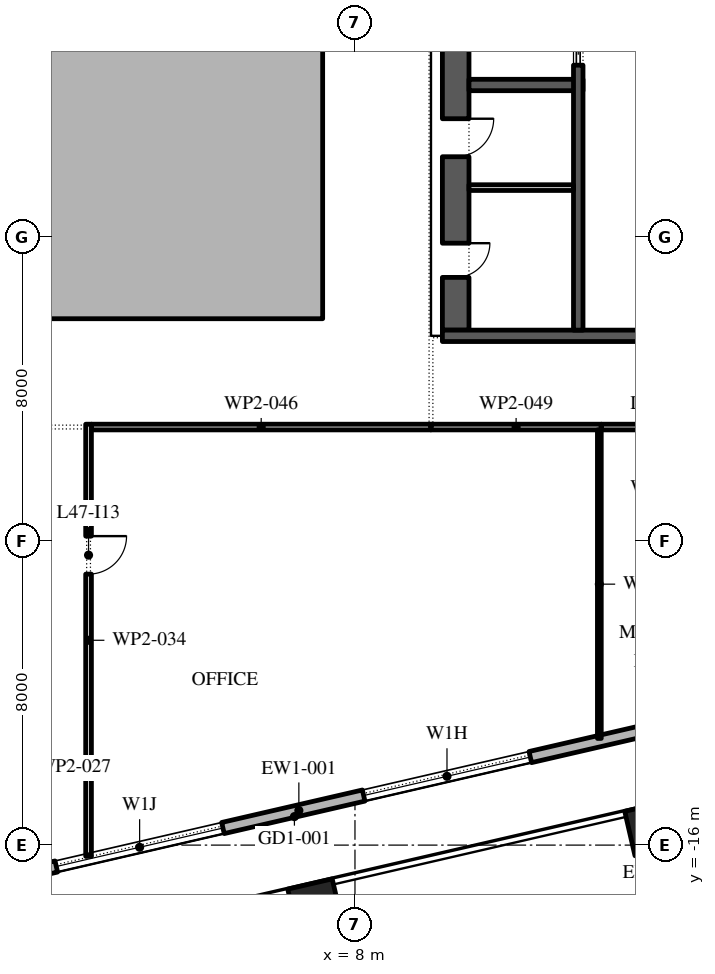
"""IFC4 building model, lengths in metres.
Left out: names, types, materials, properties, quantities, classifications, styles, units other than length and angle.
Written with IfcOpenShell. Run it as: python <this file> out.ifc"""

import sys

from ifc_helpers import new_model, si_unit, direction, frame, frame_2d, origin, origin_2d, place, context, subcontext, project, spatial, polyline, rectangle, outline, extrude, element, fill, save


model = new_model("IFC4")
c1 = context("Model", 3, precision=1e-05, world=origin(), true_north=direction((0.0, 1.0)))
c2 = subcontext(c1, "Body", "Model", "MODEL_VIEW")
j1 = project(units=[si_unit("LENGTHUNIT", "METRE"), si_unit("PLANEANGLEUNIT", "RADIAN")], contexts=[c1])
p1 = place(None, origin())
s1 = spatial("IfcSite", under=j1, at=p1, CompositionType="ELEMENT")
p2 = place(p1, origin())
s2 = spatial("IfcBuilding", under=s1, at=p2, CompositionType="ELEMENT")
p3 = place(p2, frame((0.0, 0.0, 213.6)))
s3 = spatial("IfcBuildingStorey", under=s2, at=p3, CompositionType="ELEMENT", Elevation=213.6)
for number, where, z_axis, x_axis in (
    (1, (6.951, -17.608, 0.0), (0.0, 0.0, 1.0), (0.974, 0.225, 0.0)),
    (2, (15.818, -15.561, 0.0), (0.0, 0.0, 1.0), (0.974, 0.225, 0.0)),
):
    element("IfcColumn", number, at=place(p3, frame(where, z_axis=z_axis, x_axis=x_axis)), inside=s3, PredefinedType="COLUMN", context=c2, shape_type="SweptSolid", body=[
        extrude(rectangle(XDim=1.2, YDim=1.2, at=origin_2d()), origin(), (0.0, 0.0, 1.0), 4.2),
    ])
p4 = place(p3, origin())
e3 = element("IfcWall", 3, at=p4, inside=s3, PredefinedType="STANDARD", context=c2, shape_type="SweptSolid", body=[
    extrude(outline(polyline([(-7.15, -2.15), (7.15, -2.15), (7.15, 16.15), (-7.15, 16.15), (-7.15, -2.15)]), holes=[polyline([(-7.0, -2.0), (-7.0, 16.0), (7.0, 16.0), (7.0, -2.0), (-7.0, -2.0)])]), origin(), (0.0, 0.0, 1.0), 4.0),
])
p5 = place(p3, frame((-17.592, -20.657, 0.0), z_axis=(0.0, 0.0, 1.0), x_axis=(0.974370243697, 0.224950279389, 0.0)))
e4 = element("IfcWall", 4, at=p5, inside=s3, PredefinedType="STANDARD", context=c2, shape_type="SweptSolid", body=[
    extrude(rectangle(XDim=49.5, YDim=0.3, at=frame_2d((24.75, 0.0))), origin(), (0.0, 0.0, 1.0), 4.0),
])
p6 = place(p5, frame((2.8, 0.0, 0.0)))
e5 = element("IfcOpeningElement", 5, at=p6, cuts=e4, PredefinedType="OPENING", context=c2, shape_type="SweptSolid", body=[
    extrude(rectangle(XDim=2.4, YDim=3.5, at=frame_2d((1.2, 1.75))), frame((0.0, 0.16, 0.0), z_axis=(0.0, -1.0, 0.0), x_axis=(1.0, 0.0, 0.0)), (0.0, 0.0, 1.0), 0.32),
])
p7 = place(p5, frame((9.9, 0.0, 0.45)))
e6 = element("IfcOpeningElement", 6, at=p7, cuts=e4, PredefinedType="OPENING", context=c2, shape_type="SweptSolid", body=[
    extrude(rectangle(XDim=4.5, YDim=2.575, at=frame_2d((2.25, 1.288))), frame((0.0, 0.16, 0.0), z_axis=(0.0, -1.0, 0.0), x_axis=(1.0, 0.0, 0.0)), (0.0, 0.0, 1.0), 0.32),
])
p8 = place(p5, frame((18.2, 0.0, 0.45)))
e7 = element("IfcOpeningElement", 7, at=p8, cuts=e4, PredefinedType="OPENING", context=c2, shape_type="SweptSolid", body=[
    extrude(rectangle(XDim=4.5, YDim=2.675, at=frame_2d((2.25, 1.337))), frame((0.0, 0.16, 0.0), z_axis=(0.0, -1.0, 0.0), x_axis=(1.0, 0.0, 0.0)), (0.0, 0.0, 1.0), 0.32),
])
p9 = place(p5, frame((26.5, 0.0, 0.45)))
e8 = element("IfcOpeningElement", 8, at=p9, cuts=e4, PredefinedType="OPENING", context=c2, shape_type="SweptSolid", body=[
    extrude(rectangle(XDim=4.5, YDim=2.75, at=frame_2d((2.25, 1.375))), frame((0.0, 0.16, 0.0), z_axis=(0.0, -1.0, 0.0), x_axis=(1.0, 0.0, 0.0)), (0.0, 0.0, 1.0), 0.32),
])
p10 = place(p5, frame((36.8, 0.0, 0.0)))
e9 = element("IfcOpeningElement", 9, at=p10, cuts=e4, PredefinedType="OPENING", context=c2, shape_type="SweptSolid", body=[
    extrude(rectangle(XDim=2.4, YDim=3.275, at=frame_2d((1.2, 1.637))), frame((0.0, 0.16, 0.0), z_axis=(0.0, -1.0, 0.0), x_axis=(1.0, 0.0, 0.0)), (0.0, 0.0, 1.0), 0.32),
])
p11 = place(p5, frame((43.1, 0.0, 0.45)))
e10 = element("IfcOpeningElement", 10, at=p11, cuts=e4, PredefinedType="OPENING", context=c2, shape_type="SweptSolid", body=[
    extrude(rectangle(XDim=4.5, YDim=2.875, at=frame_2d((2.25, 1.438))), frame((0.0, 0.16, 0.0), z_axis=(0.0, -1.0, 0.0), x_axis=(1.0, 0.0, 0.0)), (0.0, 0.0, 1.0), 0.32),
])
p12 = place(p3, frame((10.65, -2.45, 0.0), z_axis=(0.0, 0.0, 1.0), x_axis=(0.0, 1.0, 0.0)))
e11 = element("IfcWall", 11, at=p12, inside=s3, PredefinedType="SHEAR", context=c2, shape_type="SweptSolid", body=[
    extrude(rectangle(XDim=27.9, YDim=0.7, at=frame_2d((13.95, 0.0))), origin(), (0.0, 0.0, 1.0), 4.0),
])
p13 = place(p12, frame((23.65, 0.0, 0.0)))
e12 = element("IfcOpeningElement", 12, at=p13, cuts=e11, PredefinedType="OPENING", context=c2, shape_type="SweptSolid", body=[
    extrude(rectangle(XDim=2.4, YDim=2.1, at=frame_2d((1.2, 1.05))), frame((0.0, 0.36, 0.0), z_axis=(0.0, -1.0, 0.0), x_axis=(1.0, 0.0, 0.0)), (0.0, 0.0, 1.0), 0.72),
])
p14 = place(p12, frame((1.387, 0.0, 0.0)))
e13 = element("IfcOpeningElement", 13, at=p14, cuts=e11, PredefinedType="OPENING", context=c2, shape_type="SweptSolid", body=[
    extrude(rectangle(XDim=0.9, YDim=2.1, at=frame_2d((0.45, 1.05))), frame((0.0, 0.36, 0.0), z_axis=(0.0, -1.0, 0.0), x_axis=(1.0, 0.0, 0.0)), (0.0, 0.0, 1.0), 0.72),
])
p15 = place(p12, frame((4.562, 0.0, 0.0)))
e14 = element("IfcOpeningElement", 14, at=p15, cuts=e11, PredefinedType="OPENING", context=c2, shape_type="SweptSolid", body=[
    extrude(rectangle(XDim=1.0, YDim=2.1, at=frame_2d((0.5, 1.05))), frame((0.0, 0.36, 0.0), z_axis=(0.0, -1.0, 0.0), x_axis=(1.0, 0.0, 0.0)), (0.0, 0.0, 1.0), 0.72),
])
p16 = place(p3, frame((10.3, -2.6, 0.0), z_axis=(0.0, 0.0, 1.0), x_axis=(1.0, 0.0, 0.0)))
e15 = element("IfcWall", 15, at=p16, inside=s3, PredefinedType="SHEAR", context=c2, shape_type="SweptSolid", body=[
    extrude(rectangle(XDim=11.4, YDim=0.3, at=frame_2d((5.7, 0.0))), origin(), (0.0, 0.0, 1.0), 4.0),
])
p17 = place(p3, frame((11.0, 4.0, 0.0), z_axis=(0.0, 0.0, 1.0), x_axis=(1.0, 0.0, 0.0)))
e16 = element("IfcWall", 16, at=p17, inside=s3, PredefinedType="SHEAR", context=c2, shape_type="SweptSolid", body=[
    extrude(rectangle(XDim=3.0, YDim=0.3, at=frame_2d((1.5, 0.0))), origin(), (0.0, 0.0, 1.0), 4.0),
])
p18 = place(p3, frame((13.875, -2.45, 0.0), z_axis=(0.0, 0.0, 1.0), x_axis=(0.0, 1.0, 0.0)))
e17 = element("IfcWall", 17, at=p18, inside=s3, PredefinedType="SHEAR", context=c2, shape_type="SweptSolid", body=[
    extrude(rectangle(XDim=21.3, YDim=0.25, at=frame_2d((10.65, 0.0))), origin(), (0.0, 0.0, 1.0), 4.0),
])
p19 = place(p18, frame((17.786, 0.0, 0.0)))
e18 = element("IfcOpeningElement", 18, at=p19, cuts=e17, PredefinedType="OPENING", context=c2, shape_type="SweptSolid", body=[
    extrude(rectangle(XDim=0.9, YDim=2.1, at=frame_2d((0.45, 1.05))), frame((0.0, 0.135, 0.0), z_axis=(0.0, -1.0, 0.0), x_axis=(1.0, 0.0, 0.0)), (0.0, 0.0, 1.0), 0.27),
])
p20 = place(p18, frame((6.971, 0.0, 0.0)))
e19 = element("IfcOpeningElement", 19, at=p20, cuts=e17, PredefinedType="OPENING", context=c2, shape_type="SweptSolid", body=[
    extrude(rectangle(XDim=1.1, YDim=2.1, at=frame_2d((0.55, 1.05))), frame((0.0, 0.135, 0.0), z_axis=(0.0, -1.0, 0.0), x_axis=(1.0, 0.0, 0.0)), (0.0, 0.0, 1.0), 0.27),
])
p21 = place(p18, frame((9.114, 0.0, 0.0)))
e20 = element("IfcOpeningElement", 20, at=p21, cuts=e17, PredefinedType="OPENING", context=c2, shape_type="SweptSolid", body=[
    extrude(rectangle(XDim=1.1, YDim=2.1, at=frame_2d((0.55, 1.05))), frame((0.0, 0.135, 0.0), z_axis=(0.0, -1.0, 0.0), x_axis=(1.0, 0.0, 0.0)), (0.0, 0.0, 1.0), 0.27),
])
p22 = place(p18, frame((11.257, 0.0, 0.0)))
e21 = element("IfcOpeningElement", 21, at=p22, cuts=e17, PredefinedType="OPENING", context=c2, shape_type="SweptSolid", body=[
    extrude(rectangle(XDim=1.1, YDim=2.1, at=frame_2d((0.55, 1.05))), frame((0.0, 0.135, 0.0), z_axis=(0.0, -1.0, 0.0), x_axis=(1.0, 0.0, 0.0)), (0.0, 0.0, 1.0), 0.27),
])
p23 = place(p18, frame((13.4, 0.0, 0.0)))
e22 = element("IfcOpeningElement", 22, at=p23, cuts=e17, PredefinedType="OPENING", context=c2, shape_type="SweptSolid", body=[
    extrude(rectangle(XDim=1.1, YDim=2.1, at=frame_2d((0.55, 1.05))), frame((0.0, 0.135, 0.0), z_axis=(0.0, -1.0, 0.0), x_axis=(1.0, 0.0, 0.0)), (0.0, 0.0, 1.0), 0.27),
])
p24 = place(p3, frame((11.0, 1.3, 0.0), z_axis=(0.0, 0.0, 1.0), x_axis=(1.0, 0.0, 0.0)))
e23 = element("IfcWall", 23, at=p24, inside=s3, PredefinedType="PARTITIONING", context=c2, shape_type="SweptSolid", body=[
    extrude(rectangle(XDim=2.75, YDim=0.15, at=frame_2d((1.375, 0.0))), origin(), (0.0, 0.0, 1.0), 4.0),
])
p25 = place(p3, frame((0.99, -4.925, 0.0), z_axis=(0.0, 0.0, 1.0), x_axis=(0.0, -1.0, 0.0)))
e24 = element("IfcWall", 24, at=p25, inside=s3, PredefinedType="PARTITIONING", context=c2, shape_type="SweptSolid", body=[
    extrude(rectangle(XDim=11.371, YDim=0.15, at=frame_2d((5.686, 0.0))), origin(), (0.0, 0.0, 1.0), 4.0),
])
p26 = place(p25, frame((2.945, 0.0, 0.0)))
e25 = element("IfcOpeningElement", 25, at=p26, cuts=e24, PredefinedType="OPENING", context=c2, shape_type="SweptSolid", body=[
    extrude(rectangle(XDim=1.0, YDim=2.1, at=frame_2d((0.5, 1.05))), frame((0.0, 0.085, 0.0), z_axis=(0.0, -1.0, 0.0), x_axis=(1.0, 0.0, 0.0)), (0.0, 0.0, 1.0), 0.17),
])
p27 = place(p3, frame((10.0, -5.0, 0.0), z_axis=(0.0, 0.0, 1.0), x_axis=(-1.0, 0.0, 0.0)))
e26 = element("IfcWall", 26, at=p27, inside=s3, PredefinedType="PARTITIONING", context=c2, shape_type="SweptSolid", body=[
    extrude(rectangle(XDim=8.935, YDim=0.15, at=frame_2d((4.468, 0.0))), origin(), (0.0, 0.0, 1.0), 4.0),
])
p28 = place(p3, frame((14.48, -5.0, 0.0), z_axis=(0.0, 0.0, 1.0), x_axis=(-1.0, 0.0, 0.0)))
e27 = element("IfcWall", 27, at=p28, inside=s3, PredefinedType="PARTITIONING", context=c2, shape_type="SweptSolid", body=[
    extrude(rectangle(XDim=4.48, YDim=0.15, at=frame_2d((2.24, 0.0))), origin(), (0.0, 0.0, 1.0), 4.0),
])
p29 = place(p3, frame((14.43, -5.075, 0.0), z_axis=(0.0, 0.0, 1.0), x_axis=(0.0, -1.0, 0.0)))
e28 = element("IfcWall", 28, at=p29, inside=s3, PredefinedType="PARTITIONING", context=c2, shape_type="SweptSolid", body=[
    extrude(rectangle(XDim=8.118, YDim=0.1, at=frame_2d((4.059, 0.0))), origin(), (0.0, 0.0, 1.0), 4.0),
])
p30 = place(p3, frame((17.97, -5.0, 0.0), z_axis=(0.0, 0.0, 1.0), x_axis=(-1.0, 0.0, 0.0)))
e29 = element("IfcWall", 29, at=p30, inside=s3, PredefinedType="PARTITIONING", context=c2, shape_type="SweptSolid", body=[
    extrude(rectangle(XDim=3.49, YDim=0.15, at=frame_2d((1.745, 0.0))), origin(), (0.0, 0.0, 1.0), 4.0),
])
p31 = place(p30, frame((1.39, 0.0, 0.0)))
e30 = element("IfcOpeningElement", 30, at=p31, cuts=e29, PredefinedType="OPENING", context=c2, shape_type="SweptSolid", body=[
    extrude(rectangle(XDim=1.0, YDim=2.1, at=frame_2d((0.5, 1.05))), frame((0.0, 0.085, 0.0), z_axis=(0.0, -1.0, 0.0), x_axis=(1.0, 0.0, 0.0)), (0.0, 0.0, 1.0), 0.17),
])
p32 = place(p8, origin())
e31 = element("IfcWindow", 31, at=p32, inside=s3, PartitioningType="DOUBLE_PANEL_VERTICAL", PredefinedType="WINDOW", context=c2, shape_type="SweptSolid", body=[
    extrude(rectangle(XDim=4.5, YDim=2.675, at=frame_2d((2.25, 1.337))), frame((0.0, 0.03, 0.0), z_axis=(0.0, -1.0, 0.0), x_axis=(1.0, 0.0, 0.0)), (0.0, 0.0, 1.0), 0.06),
])
fill(e7, e31)
p33 = place(p9, origin())
e32 = element("IfcWindow", 32, at=p33, inside=s3, PartitioningType="DOUBLE_PANEL_VERTICAL", PredefinedType="WINDOW", context=c2, shape_type="SweptSolid", body=[
    extrude(rectangle(XDim=4.5, YDim=2.75, at=frame_2d((2.25, 1.375))), frame((0.0, 0.03, 0.0), z_axis=(0.0, -1.0, 0.0), x_axis=(1.0, 0.0, 0.0)), (0.0, 0.0, 1.0), 0.06),
])
fill(e8, e32)
p34 = place(p20, origin())
e33 = element("IfcDoor", 33, at=p34, inside=s3, OperationType="SLIDING_TO_LEFT", PredefinedType="DOOR", context=c2, shape_type="SweptSolid", body=[
    extrude(rectangle(XDim=1.1, YDim=2.1, at=frame_2d((0.55, 1.05))), frame((0.0, 0.025, 0.0), z_axis=(0.0, -1.0, 0.0), x_axis=(1.0, 0.0, 0.0)), (0.0, 0.0, 1.0), 0.05),
])
fill(e19, e33)
p35 = place(p14, frame((0.9, -0.65, 0.0), z_axis=(0.0, 0.0, 1.0), x_axis=(-1.0, 0.0, 0.0)))
e34 = element("IfcDoor", 34, at=p35, inside=s3, OperationType="SINGLE_SWING_RIGHT", PredefinedType="DOOR", context=c2, shape_type="SweptSolid", body=[
    extrude(rectangle(XDim=0.9, YDim=2.1, at=frame_2d((0.45, 1.05))), frame((0.0, -0.3, 0.0), z_axis=(0.0, -1.0, 0.0), x_axis=(1.0, 0.0, 0.0)), (0.0, 0.0, 1.0), 0.05),
])
fill(e13, e34)
p36 = place(p15, frame((1.0, -0.65, 0.0), z_axis=(0.0, 0.0, 1.0), x_axis=(-1.0, 0.0, 0.0)))
e35 = element("IfcDoor", 35, at=p36, inside=s3, OperationType="SINGLE_SWING_RIGHT", PredefinedType="DOOR", context=c2, shape_type="SweptSolid", body=[
    extrude(rectangle(XDim=1.0, YDim=2.1, at=frame_2d((0.5, 1.05))), frame((0.0, -0.3, 0.0), z_axis=(0.0, -1.0, 0.0), x_axis=(1.0, 0.0, 0.0)), (0.0, 0.0, 1.0), 0.05),
])
fill(e14, e35)
p37 = place(p26, origin())
e36 = element("IfcDoor", 36, at=p37, inside=s3, OperationType="SINGLE_SWING_RIGHT", PredefinedType="DOOR", context=c2, shape_type="SweptSolid", body=[
    extrude(rectangle(XDim=1.0, YDim=2.1, at=frame_2d((0.5, 1.05))), frame((0.0, 0.025, 0.0), z_axis=(0.0, -1.0, 0.0), x_axis=(1.0, 0.0, 0.0)), (0.0, 0.0, 1.0), 0.05),
])
fill(e25, e36)
save(model, sys.argv[1])
